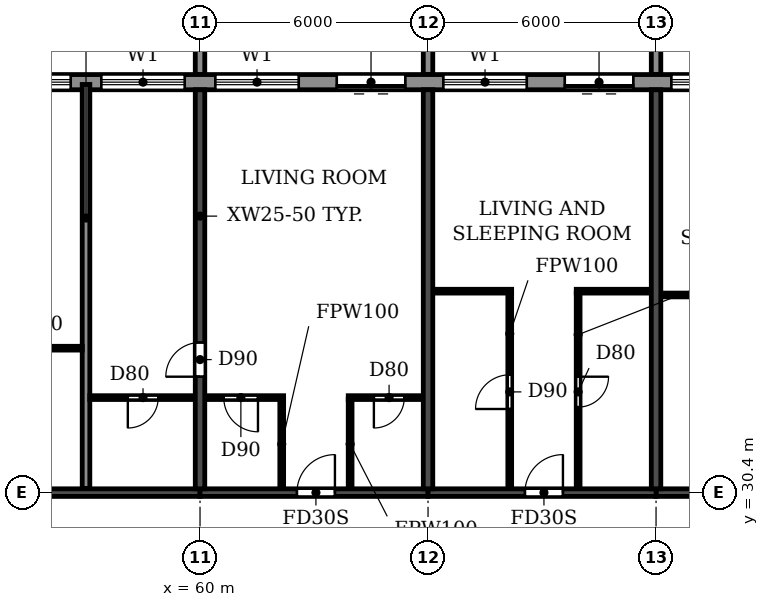
"""IFC4 building model, lengths in metres.
Left out: names, types, materials, properties, quantities, classifications, styles, units other than length and angle.
Written with IfcOpenShell. Run it as: python <this file> out.ifc"""

import sys

from ifc_helpers import new_model, si_unit, direction, frame, frame_2d, origin, place, context, subcontext, project, spatial, polyline, rectangle, outline, extrude, source, transform, mapped, element, fill, save


model = new_model("IFC4")
c1 = context("Model", 3, precision=1e-05, world=origin(), true_north=direction((0.0, 1.0)))
c2 = subcontext(c1, "Body", "Model", "MODEL_VIEW")
j1 = project(units=[si_unit("LENGTHUNIT", "METRE"), si_unit("PLANEANGLEUNIT", "RADIAN")], contexts=[c1])
p1 = place(None, origin())
s1 = spatial("IfcSite", under=j1, at=p1, CompositionType="ELEMENT")
p2 = place(p1, origin())
s2 = spatial("IfcBuilding", under=s1, at=p2, CompositionType="ELEMENT")
p3 = place(p2, frame((0.0, 0.0, 221.4)))
s3 = spatial("IfcBuildingStorey", under=s2, at=p3, CompositionType="ELEMENT", Elevation=221.4)
p4 = place(p3, frame((60.0, 30.5, 0.0), z_axis=(0.0, 0.0, 1.0), x_axis=(0.0, 1.0, 0.0)))
e1 = element("IfcWall", 1, at=p4, inside=s3, PredefinedType="SHEAR", context=c2, shape_type="SweptSolid", body=[
    extrude(rectangle(XDim=10.5, YDim=0.25, at=frame_2d((5.25, 0.0))), origin(), (0.0, 0.0, 1.0), 3.08),
])
p5 = place(p4, frame((2.95, 0.0, 0.0)))
e2 = element("IfcOpeningElement", 2, at=p5, cuts=e1, PredefinedType="OPENING", context=c2, shape_type="SweptSolid", body=[
    extrude(rectangle(XDim=0.9, YDim=2.1, at=frame_2d((0.45, 1.05))), frame((0.0, 0.135, 0.0), z_axis=(0.0, -1.0, 0.0), x_axis=(1.0, 0.0, 0.0)), (0.0, 0.0, 1.0), 0.27),
])
for number, where, z_axis, x_axis in (
    (3, (66.0, 30.5, 0.0), (0.0, 0.0, 1.0), (0.0, 1.0, 0.0)),
    (4, (72.0, 30.5, 0.0), (0.0, 0.0, 1.0), (0.0, 1.0, 0.0)),
):
    element("IfcWall", number, at=place(p3, frame(where, z_axis=z_axis, x_axis=x_axis)), inside=s3, PredefinedType="SHEAR", context=c2, shape_type="SweptSolid", body=[
        extrude(rectangle(XDim=10.5, YDim=0.25, at=frame_2d((5.25, 0.0))), origin(), (0.0, 0.0, 1.0), 3.08),
    ])
p6 = place(p3, frame((54.0, 30.4, 0.0), z_axis=(0.0, 0.0, 1.0), x_axis=(1.0, 0.0, 0.0)))
e5 = element("IfcWall", 5, at=p6, inside=s3, PredefinedType="SHEAR", context=c2, shape_type="SweptSolid", body=[
    extrude(rectangle(XDim=6.0, YDim=0.2, at=frame_2d((3.0, 0.0))), origin(), (0.0, 0.0, 1.0), 2.48),
])
p7 = place(p3, frame((60.0, 30.4, 0.0), z_axis=(0.0, 0.0, 1.0), x_axis=(1.0, 0.0, 0.0)))
e6 = element("IfcWall", 6, at=p7, inside=s3, PredefinedType="SHEAR", context=c2, shape_type="SweptSolid", body=[
    extrude(rectangle(XDim=6.0, YDim=0.2, at=frame_2d((3.0, 0.0))), origin(), (0.0, 0.0, 1.0), 2.48),
])
p8 = place(p7, frame((2.55, 0.0, 0.0)))
e7 = element("IfcOpeningElement", 7, at=p8, cuts=e6, PredefinedType="OPENING", context=c2, shape_type="SweptSolid", body=[
    extrude(rectangle(XDim=1.0, YDim=2.1, at=frame_2d((0.5, 1.05))), frame((0.0, 0.11, 0.0), z_axis=(0.0, -1.0, 0.0), x_axis=(1.0, 0.0, 0.0)), (0.0, 0.0, 1.0), 0.22),
])
p9 = place(p3, frame((66.0, 30.4, 0.0), z_axis=(0.0, 0.0, 1.0), x_axis=(1.0, 0.0, 0.0)))
e8 = element("IfcWall", 8, at=p9, inside=s3, PredefinedType="SHEAR", context=c2, shape_type="SweptSolid", body=[
    extrude(rectangle(XDim=6.0, YDim=0.2, at=frame_2d((3.0, 0.0))), origin(), (0.0, 0.0, 1.0), 2.48),
])
p10 = place(p9, frame((2.55, 0.0, 0.0)))
e9 = element("IfcOpeningElement", 9, at=p10, cuts=e8, PredefinedType="OPENING", context=c2, shape_type="SweptSolid", body=[
    extrude(rectangle(XDim=1.0, YDim=2.1, at=frame_2d((0.5, 1.05))), frame((0.0, 0.11, 0.0), z_axis=(0.0, -1.0, 0.0), x_axis=(1.0, 0.0, 0.0)), (0.0, 0.0, 1.0), 0.22),
])
p11 = place(p3, frame((72.0, 30.4, 0.0), z_axis=(0.0, 0.0, 1.0), x_axis=(1.0, 0.0, 0.0)))
e10 = element("IfcWall", 10, at=p11, inside=s3, PredefinedType="SHEAR", context=c2, shape_type="SweptSolid", body=[
    extrude(rectangle(XDim=6.0, YDim=0.2, at=frame_2d((3.0, 0.0))), origin(), (0.0, 0.0, 1.0), 2.48),
])
p12 = place(p11, frame((2.45, 0.0, 0.0)))
e11 = element("IfcOpeningElement", 11, at=p12, cuts=e10, PredefinedType="OPENING", context=c2, shape_type="SweptSolid", body=[
    extrude(rectangle(XDim=1.0, YDim=2.1, at=frame_2d((0.5, 1.05))), frame((0.0, 0.11, 0.0), z_axis=(0.0, -1.0, 0.0), x_axis=(1.0, 0.0, 0.0)), (0.0, 0.0, 1.0), 0.22),
])
p13 = place(p3, frame((79.317, 41.2, 0.0), z_axis=(0.0, 0.0, 1.0), x_axis=(-1.0, 0.0, 0.0)))
e12 = element("IfcWall", 12, at=p13, inside=s3, PredefinedType="STANDARD", context=c2, shape_type="SweptSolid", body=[
    extrude(rectangle(XDim=56.634, YDim=0.4, at=frame_2d((28.317, 0.0))), origin(), (0.0, 0.0, 1.0), 3.08),
])
p14 = place(p13, frame((52.717, 0.0, 0.9)))
e13 = element("IfcOpeningElement", 13, at=p14, cuts=e12, PredefinedType="OPENING", context=c2, shape_type="SweptSolid", body=[
    extrude(rectangle(XDim=2.2, YDim=1.5, at=frame_2d((1.1, 0.75))), frame((0.0, 0.21, 0.0), z_axis=(0.0, -1.0, 0.0), x_axis=(1.0, 0.0, 0.0)), (0.0, 0.0, 1.0), 0.42),
])
p15 = place(p13, frame((49.717, 0.0, 0.9)))
e14 = element("IfcOpeningElement", 14, at=p15, cuts=e12, PredefinedType="OPENING", context=c2, shape_type="SweptSolid", body=[
    extrude(rectangle(XDim=2.2, YDim=1.5, at=frame_2d((1.1, 0.75))), frame((0.0, 0.21, 0.0), z_axis=(0.0, -1.0, 0.0), x_axis=(1.0, 0.0, 0.0)), (0.0, 0.0, 1.0), 0.42),
])
p16 = place(p13, frame((46.917, 0.0, 0.0)))
e15 = element("IfcOpeningElement", 15, at=p16, cuts=e12, PredefinedType="OPENING", context=c2, shape_type="SweptSolid", body=[
    extrude(rectangle(XDim=1.8, YDim=2.4, at=frame_2d((0.9, 1.2))), frame((0.0, 0.21, 0.0), z_axis=(0.0, -1.0, 0.0), x_axis=(1.0, 0.0, 0.0)), (0.0, 0.0, 1.0), 0.42),
])
p17 = place(p13, frame((43.717, 0.0, 0.9)))
e16 = element("IfcOpeningElement", 16, at=p17, cuts=e12, PredefinedType="OPENING", context=c2, shape_type="SweptSolid", body=[
    extrude(rectangle(XDim=2.2, YDim=1.5, at=frame_2d((1.1, 0.75))), frame((0.0, 0.21, 0.0), z_axis=(0.0, -1.0, 0.0), x_axis=(1.0, 0.0, 0.0)), (0.0, 0.0, 1.0), 0.42),
])
p18 = place(p13, frame((40.717, 0.0, 0.9)))
e17 = element("IfcOpeningElement", 17, at=p18, cuts=e12, PredefinedType="OPENING", context=c2, shape_type="SweptSolid", body=[
    extrude(rectangle(XDim=2.2, YDim=1.5, at=frame_2d((1.1, 0.75))), frame((0.0, 0.21, 0.0), z_axis=(0.0, -1.0, 0.0), x_axis=(1.0, 0.0, 0.0)), (0.0, 0.0, 1.0), 0.42),
])
p19 = place(p13, frame((37.917, 0.0, 0.0)))
e18 = element("IfcOpeningElement", 18, at=p19, cuts=e12, PredefinedType="OPENING", context=c2, shape_type="SweptSolid", body=[
    extrude(rectangle(XDim=1.8, YDim=2.4, at=frame_2d((0.9, 1.2))), frame((0.0, 0.21, 0.0), z_axis=(0.0, -1.0, 0.0), x_axis=(1.0, 0.0, 0.0)), (0.0, 0.0, 1.0), 0.42),
])
p20 = place(p13, frame((34.717, 0.0, 0.9)))
e19 = element("IfcOpeningElement", 19, at=p20, cuts=e12, PredefinedType="OPENING", context=c2, shape_type="SweptSolid", body=[
    extrude(rectangle(XDim=2.2, YDim=1.5, at=frame_2d((1.1, 0.75))), frame((0.0, 0.21, 0.0), z_axis=(0.0, -1.0, 0.0), x_axis=(1.0, 0.0, 0.0)), (0.0, 0.0, 1.0), 0.42),
])
p21 = place(p13, frame((31.717, 0.0, 0.9)))
e20 = element("IfcOpeningElement", 20, at=p21, cuts=e12, PredefinedType="OPENING", context=c2, shape_type="SweptSolid", body=[
    extrude(rectangle(XDim=2.2, YDim=1.5, at=frame_2d((1.1, 0.75))), frame((0.0, 0.21, 0.0), z_axis=(0.0, -1.0, 0.0), x_axis=(1.0, 0.0, 0.0)), (0.0, 0.0, 1.0), 0.42),
])
p22 = place(p13, frame((28.717, 0.0, 0.9)))
e21 = element("IfcOpeningElement", 21, at=p22, cuts=e12, PredefinedType="OPENING", context=c2, shape_type="SweptSolid", body=[
    extrude(rectangle(XDim=2.2, YDim=1.5, at=frame_2d((1.1, 0.75))), frame((0.0, 0.21, 0.0), z_axis=(0.0, -1.0, 0.0), x_axis=(1.0, 0.0, 0.0)), (0.0, 0.0, 1.0), 0.42),
])
p23 = place(p13, frame((25.917, 0.0, 0.0)))
e22 = element("IfcOpeningElement", 22, at=p23, cuts=e12, PredefinedType="OPENING", context=c2, shape_type="SweptSolid", body=[
    extrude(rectangle(XDim=1.8, YDim=2.4, at=frame_2d((0.9, 1.2))), frame((0.0, 0.21, 0.0), z_axis=(0.0, -1.0, 0.0), x_axis=(1.0, 0.0, 0.0)), (0.0, 0.0, 1.0), 0.42),
])
p24 = place(p13, frame((22.717, 0.0, 0.9)))
e23 = element("IfcOpeningElement", 23, at=p24, cuts=e12, PredefinedType="OPENING", context=c2, shape_type="SweptSolid", body=[
    extrude(rectangle(XDim=2.2, YDim=1.5, at=frame_2d((1.1, 0.75))), frame((0.0, 0.21, 0.0), z_axis=(0.0, -1.0, 0.0), x_axis=(1.0, 0.0, 0.0)), (0.0, 0.0, 1.0), 0.42),
])
p25 = place(p13, frame((19.717, 0.0, 0.9)))
e24 = element("IfcOpeningElement", 24, at=p25, cuts=e12, PredefinedType="OPENING", context=c2, shape_type="SweptSolid", body=[
    extrude(rectangle(XDim=2.2, YDim=1.5, at=frame_2d((1.1, 0.75))), frame((0.0, 0.21, 0.0), z_axis=(0.0, -1.0, 0.0), x_axis=(1.0, 0.0, 0.0)), (0.0, 0.0, 1.0), 0.42),
])
p26 = place(p13, frame((16.717, 0.0, 0.9)))
e25 = element("IfcOpeningElement", 25, at=p26, cuts=e12, PredefinedType="OPENING", context=c2, shape_type="SweptSolid", body=[
    extrude(rectangle(XDim=2.2, YDim=1.5, at=frame_2d((1.1, 0.75))), frame((0.0, 0.21, 0.0), z_axis=(0.0, -1.0, 0.0), x_axis=(1.0, 0.0, 0.0)), (0.0, 0.0, 1.0), 0.42),
])
p27 = place(p13, frame((13.917, 0.0, 0.0)))
e26 = element("IfcOpeningElement", 26, at=p27, cuts=e12, PredefinedType="OPENING", context=c2, shape_type="SweptSolid", body=[
    extrude(rectangle(XDim=1.8, YDim=2.4, at=frame_2d((0.9, 1.2))), frame((0.0, 0.21, 0.0), z_axis=(0.0, -1.0, 0.0), x_axis=(1.0, 0.0, 0.0)), (0.0, 0.0, 1.0), 0.42),
])
p28 = place(p13, frame((10.717, 0.0, 0.9)))
e27 = element("IfcOpeningElement", 27, at=p28, cuts=e12, PredefinedType="OPENING", context=c2, shape_type="SweptSolid", body=[
    extrude(rectangle(XDim=2.2, YDim=1.5, at=frame_2d((1.1, 0.75))), frame((0.0, 0.21, 0.0), z_axis=(0.0, -1.0, 0.0), x_axis=(1.0, 0.0, 0.0)), (0.0, 0.0, 1.0), 0.42),
])
p29 = place(p13, frame((7.917, 0.0, 0.0)))
e28 = element("IfcOpeningElement", 28, at=p29, cuts=e12, PredefinedType="OPENING", context=c2, shape_type="SweptSolid", body=[
    extrude(rectangle(XDim=1.8, YDim=2.4, at=frame_2d((0.9, 1.2))), frame((0.0, 0.21, 0.0), z_axis=(0.0, -1.0, 0.0), x_axis=(1.0, 0.0, 0.0)), (0.0, 0.0, 1.0), 0.42),
])
p30 = place(p13, frame((4.717, 0.0, 0.9)))
e29 = element("IfcOpeningElement", 29, at=p30, cuts=e12, PredefinedType="OPENING", context=c2, shape_type="SweptSolid", body=[
    extrude(rectangle(XDim=2.2, YDim=1.5, at=frame_2d((1.1, 0.75))), frame((0.0, 0.21, 0.0), z_axis=(0.0, -1.0, 0.0), x_axis=(1.0, 0.0, 0.0)), (0.0, 0.0, 1.0), 0.42),
])
p31 = place(p13, frame((1.917, 0.0, 0.0)))
e30 = element("IfcOpeningElement", 30, at=p31, cuts=e12, PredefinedType="OPENING", context=c2, shape_type="SweptSolid", body=[
    extrude(rectangle(XDim=1.8, YDim=2.4, at=frame_2d((0.9, 1.2))), frame((0.0, 0.21, 0.0), z_axis=(0.0, -1.0, 0.0), x_axis=(1.0, 0.0, 0.0)), (0.0, 0.0, 1.0), 0.42),
])
m1 = source(origin(), c2, "Body", "SweptSolid", [
    extrude(outline(polyline([(0.0, 0.0), (0.25, 0.0), (0.25, 3.1), (0.0, 3.1), (0.0, 0.0)])), origin(), (0.0, 0.0, 1.0), 3.1),
])
for number, where in (
    (31, (59.875, 41.4, 0.0)),
    (32, (65.875, 41.4, 0.0)),
    (33, (71.875, 41.4, 0.0)),
):
    element("IfcWall", number, at=place(p3, frame(where)), inside=s3, PredefinedType="STANDARD", context=c2, shape_type="MappedRepresentation", body=[
        mapped(m1, transform((0.0, 0.0, 0.0))),
    ])
p32 = place(p3, frame((57.0, 30.51, 0.0), z_axis=(0.0, 0.0, 1.0), x_axis=(0.0, 1.0, 0.0)))
e34 = element("IfcWall", 34, at=p32, inside=s3, PredefinedType="PARTITIONING", context=c2, shape_type="SweptSolid", body=[
    extrude(rectangle(XDim=10.63, YDim=0.2, at=frame_2d((5.315, 0.0))), origin(), (0.0, 0.0, 1.0), 3.08),
])
p33 = place(p3, frame((57.1, 32.9, 0.0), z_axis=(0.0, 0.0, 1.0), x_axis=(1.0, 0.0, 0.0)))
e35 = element("IfcWall", 35, at=p33, inside=s3, PredefinedType="PARTITIONING", context=c2, shape_type="SweptSolid", body=[
    extrude(rectangle(XDim=2.765, YDim=0.1, at=frame_2d((1.382, 0.0))), origin(), (0.0, 0.0, 1.0), 3.08),
])
p34 = place(p33, frame((1.0, 0.0, 0.0)))
e36 = element("IfcOpeningElement", 36, at=p34, cuts=e35, PredefinedType="OPENING", context=c2, shape_type="SweptSolid", body=[
    extrude(rectangle(XDim=0.8, YDim=2.1, at=frame_2d((0.4, 1.05))), frame((0.0, 0.06, 0.0), z_axis=(0.0, -1.0, 0.0), x_axis=(1.0, 0.0, 0.0)), (0.0, 0.0, 1.0), 0.12),
])
p35 = place(p3, frame((60.135, 32.9, 0.0), z_axis=(0.0, 0.0, 1.0), x_axis=(1.0, 0.0, 0.0)))
e37 = element("IfcWall", 37, at=p35, inside=s3, PredefinedType="PARTITIONING", context=c2, shape_type="SweptSolid", body=[
    extrude(rectangle(XDim=2.065, YDim=0.1, at=frame_2d((1.032, 0.0))), origin(), (0.0, 0.0, 1.0), 3.08),
])
p36 = place(p35, frame((0.49, 0.0, 0.0)))
e38 = element("IfcOpeningElement", 38, at=p36, cuts=e37, PredefinedType="OPENING", context=c2, shape_type="SweptSolid", body=[
    extrude(rectangle(XDim=0.9, YDim=2.1, at=frame_2d((0.45, 1.05))), frame((0.0, 0.06, 0.0), z_axis=(0.0, -1.0, 0.0), x_axis=(1.0, 0.0, 0.0)), (0.0, 0.0, 1.0), 0.12),
])
p37 = place(p3, frame((63.9, 32.9, 0.0), z_axis=(0.0, 0.0, 1.0), x_axis=(1.0, 0.0, 0.0)))
e39 = element("IfcWall", 39, at=p37, inside=s3, PredefinedType="PARTITIONING", context=c2, shape_type="SweptSolid", body=[
    extrude(rectangle(XDim=1.965, YDim=0.1, at=frame_2d((0.982, 0.0))), origin(), (0.0, 0.0, 1.0), 3.08),
])
p38 = place(p37, frame((0.675, 0.0, 0.0)))
e40 = element("IfcOpeningElement", 40, at=p38, cuts=e39, PredefinedType="OPENING", context=c2, shape_type="SweptSolid", body=[
    extrude(rectangle(XDim=0.8, YDim=2.1, at=frame_2d((0.4, 1.05))), frame((0.0, 0.06, 0.0), z_axis=(0.0, -1.0, 0.0), x_axis=(1.0, 0.0, 0.0)), (0.0, 0.0, 1.0), 0.12),
])
p39 = place(p3, frame((54.135, 34.2, 0.0), z_axis=(0.0, 0.0, 1.0), x_axis=(1.0, 0.0, 0.0)))
e41 = element("IfcWall", 41, at=p39, inside=s3, PredefinedType="PARTITIONING", context=c2, shape_type="SweptSolid", body=[
    extrude(rectangle(XDim=2.765, YDim=0.1, at=frame_2d((1.382, 0.0))), origin(), (0.0, 0.0, 1.0), 3.08),
])
p40 = place(p39, frame((0.965, 0.0, 0.0)))
e42 = element("IfcOpeningElement", 42, at=p40, cuts=e41, PredefinedType="OPENING", context=c2, shape_type="SweptSolid", body=[
    extrude(rectangle(XDim=0.8, YDim=2.1, at=frame_2d((0.4, 1.05))), frame((0.0, 0.06, 0.0), z_axis=(0.0, -1.0, 0.0), x_axis=(1.0, 0.0, 0.0)), (0.0, 0.0, 1.0), 0.12),
])
p41 = place(p3, frame((72.135, 35.6, 0.0), z_axis=(0.0, 0.0, 1.0), x_axis=(1.0, 0.0, 0.0)))
e43 = element("IfcWall", 43, at=p41, inside=s3, PredefinedType="PARTITIONING", context=c2, shape_type="SweptSolid", body=[
    extrude(rectangle(XDim=1.965, YDim=0.1, at=frame_2d((0.982, 0.0))), origin(), (0.0, 0.0, 1.0), 3.08),
])
p42 = place(p3, frame((66.135, 35.7, 0.0), z_axis=(0.0, 0.0, 1.0), x_axis=(1.0, 0.0, 0.0)))
e44 = element("IfcWall", 44, at=p42, inside=s3, PredefinedType="PARTITIONING", context=c2, shape_type="SweptSolid", body=[
    extrude(rectangle(XDim=2.065, YDim=0.1, at=frame_2d((1.032, 0.0))), origin(), (0.0, 0.0, 1.0), 3.08),
])
p43 = place(p3, frame((69.9, 35.7, 0.0), z_axis=(0.0, 0.0, 1.0), x_axis=(1.0, 0.0, 0.0)))
e45 = element("IfcWall", 45, at=p43, inside=s3, PredefinedType="PARTITIONING", context=c2, shape_type="SweptSolid", body=[
    extrude(rectangle(XDim=1.965, YDim=0.1, at=frame_2d((0.982, 0.0))), origin(), (0.0, 0.0, 1.0), 3.08),
])
for number, where, z_axis, x_axis in (
    (46, (62.15, 30.51, 0.0), (0.0, 0.0, 1.0), (0.0, 1.0, 0.0)),
    (47, (63.95, 30.51, 0.0), (0.0, 0.0, 1.0), (0.0, 1.0, 0.0)),
):
    element("IfcWall", number, at=place(p3, frame(where, z_axis=z_axis, x_axis=x_axis)), inside=s3, PredefinedType="PARTITIONING", context=c2, shape_type="SweptSolid", body=[
        extrude(rectangle(XDim=2.34, YDim=0.1, at=frame_2d((1.17, 0.0))), origin(), (0.0, 0.0, 1.0), 3.08),
    ])
p44 = place(p3, frame((68.15, 30.51, 0.0), z_axis=(0.0, 0.0, 1.0), x_axis=(0.0, 1.0, 0.0)))
e48 = element("IfcWall", 48, at=p44, inside=s3, PredefinedType="PARTITIONING", context=c2, shape_type="SweptSolid", body=[
    extrude(rectangle(XDim=5.14, YDim=0.1, at=frame_2d((2.57, 0.0))), origin(), (0.0, 0.0, 1.0), 3.08),
])
p45 = place(p44, frame((2.09, 0.0, 0.0)))
e49 = element("IfcOpeningElement", 49, at=p45, cuts=e48, PredefinedType="OPENING", context=c2, shape_type="SweptSolid", body=[
    extrude(rectangle(XDim=0.9, YDim=2.1, at=frame_2d((0.45, 1.05))), frame((0.0, 0.06, 0.0), z_axis=(0.0, -1.0, 0.0), x_axis=(1.0, 0.0, 0.0)), (0.0, 0.0, 1.0), 0.12),
])
p46 = place(p3, frame((69.95, 30.51, 0.0), z_axis=(0.0, 0.0, 1.0), x_axis=(0.0, 1.0, 0.0)))
e50 = element("IfcWall", 50, at=p46, inside=s3, PredefinedType="PARTITIONING", context=c2, shape_type="SweptSolid", body=[
    extrude(rectangle(XDim=5.14, YDim=0.1, at=frame_2d((2.57, 0.0))), origin(), (0.0, 0.0, 1.0), 3.08),
])
p47 = place(p46, frame((2.14, 0.0, 0.0)))
e51 = element("IfcOpeningElement", 51, at=p47, cuts=e50, PredefinedType="OPENING", context=c2, shape_type="SweptSolid", body=[
    extrude(rectangle(XDim=0.8, YDim=2.1, at=frame_2d((0.4, 1.05))), frame((0.0, 0.06, 0.0), z_axis=(0.0, -1.0, 0.0), x_axis=(1.0, 0.0, 0.0)), (0.0, 0.0, 1.0), 0.12),
])
p48 = place(p24, origin())
e52 = element("IfcWindow", 52, at=p48, inside=s3, PartitioningType="DOUBLE_PANEL_HORIZONTAL", PredefinedType="WINDOW", context=c2, shape_type="SweptSolid", body=[
    extrude(rectangle(XDim=2.2, YDim=1.5, at=frame_2d((1.1, 0.75))), frame((0.0, 0.03, 0.0), z_axis=(0.0, -1.0, 0.0), x_axis=(1.0, 0.0, 0.0)), (0.0, 0.0, 1.0), 0.06),
])
fill(e23, e52)
p49 = place(p25, origin())
e53 = element("IfcWindow", 53, at=p49, inside=s3, PartitioningType="DOUBLE_PANEL_HORIZONTAL", PredefinedType="WINDOW", context=c2, shape_type="SweptSolid", body=[
    extrude(rectangle(XDim=2.2, YDim=1.5, at=frame_2d((1.1, 0.75))), frame((0.0, 0.03, 0.0), z_axis=(0.0, -1.0, 0.0), x_axis=(1.0, 0.0, 0.0)), (0.0, 0.0, 1.0), 0.06),
])
fill(e24, e53)
p50 = place(p26, origin())
e54 = element("IfcWindow", 54, at=p50, inside=s3, PartitioningType="DOUBLE_PANEL_HORIZONTAL", PredefinedType="WINDOW", context=c2, shape_type="SweptSolid", body=[
    extrude(rectangle(XDim=2.2, YDim=1.5, at=frame_2d((1.1, 0.75))), frame((0.0, 0.03, 0.0), z_axis=(0.0, -1.0, 0.0), x_axis=(1.0, 0.0, 0.0)), (0.0, 0.0, 1.0), 0.06),
])
fill(e25, e54)
p51 = place(p27, origin())
e55 = element("IfcDoor", 55, at=p51, inside=s3, OperationType="DOUBLE_DOOR_SLIDING", PredefinedType="DOOR", context=c2, shape_type="SweptSolid", body=[
    extrude(rectangle(XDim=1.8, YDim=2.4, at=frame_2d((0.9, 1.2))), frame((0.0, 0.025, 0.0), z_axis=(0.0, -1.0, 0.0), x_axis=(1.0, 0.0, 0.0)), (0.0, 0.0, 1.0), 0.05),
])
fill(e26, e55)
p52 = place(p28, origin())
e56 = element("IfcWindow", 56, at=p52, inside=s3, PartitioningType="DOUBLE_PANEL_HORIZONTAL", PredefinedType="WINDOW", context=c2, shape_type="SweptSolid", body=[
    extrude(rectangle(XDim=2.2, YDim=1.5, at=frame_2d((1.1, 0.75))), frame((0.0, 0.03, 0.0), z_axis=(0.0, -1.0, 0.0), x_axis=(1.0, 0.0, 0.0)), (0.0, 0.0, 1.0), 0.06),
])
fill(e27, e56)
p53 = place(p29, origin())
e57 = element("IfcDoor", 57, at=p53, inside=s3, OperationType="DOUBLE_DOOR_SLIDING", PredefinedType="DOOR", context=c2, shape_type="SweptSolid", body=[
    extrude(rectangle(XDim=1.8, YDim=2.4, at=frame_2d((0.9, 1.2))), frame((0.0, 0.025, 0.0), z_axis=(0.0, -1.0, 0.0), x_axis=(1.0, 0.0, 0.0)), (0.0, 0.0, 1.0), 0.05),
])
fill(e28, e57)
p54 = place(p30, origin())
e58 = element("IfcWindow", 58, at=p54, inside=s3, PartitioningType="DOUBLE_PANEL_HORIZONTAL", PredefinedType="WINDOW", context=c2, shape_type="SweptSolid", body=[
    extrude(rectangle(XDim=2.2, YDim=1.5, at=frame_2d((1.1, 0.75))), frame((0.0, 0.03, 0.0), z_axis=(0.0, -1.0, 0.0), x_axis=(1.0, 0.0, 0.0)), (0.0, 0.0, 1.0), 0.06),
])
fill(e29, e58)
p55 = place(p34, frame((0.8, 0.0, 0.0), z_axis=(0.0, 0.0, 1.0), x_axis=(-1.0, 0.0, 0.0)))
e59 = element("IfcDoor", 59, at=p55, inside=s3, OperationType="SINGLE_SWING_RIGHT", PredefinedType="DOOR", context=c2, shape_type="SweptSolid", body=[
    extrude(rectangle(XDim=0.8, YDim=2.1, at=frame_2d((0.4, 1.05))), frame((0.0, 0.025, 0.0), z_axis=(0.0, -1.0, 0.0), x_axis=(1.0, 0.0, 0.0)), (0.0, 0.0, 1.0), 0.05),
])
fill(e36, e59)
p56 = place(p5, origin())
e60 = element("IfcDoor", 60, at=p56, inside=s3, OperationType="SINGLE_SWING_LEFT", PredefinedType="DOOR", context=c2, shape_type="SweptSolid", body=[
    extrude(rectangle(XDim=0.9, YDim=2.1, at=frame_2d((0.45, 1.05))), frame((0.0, 0.025, 0.0), z_axis=(0.0, -1.0, 0.0), x_axis=(1.0, 0.0, 0.0)), (0.0, 0.0, 1.0), 0.05),
])
fill(e2, e60)
p57 = place(p36, frame((0.9, 0.0, 0.0), z_axis=(0.0, 0.0, 1.0), x_axis=(-1.0, 0.0, 0.0)))
e61 = element("IfcDoor", 61, at=p57, inside=s3, OperationType="SINGLE_SWING_LEFT", PredefinedType="DOOR", context=c2, shape_type="SweptSolid", body=[
    extrude(rectangle(XDim=0.9, YDim=2.1, at=frame_2d((0.45, 1.05))), frame((0.0, 0.025, 0.0), z_axis=(0.0, -1.0, 0.0), x_axis=(1.0, 0.0, 0.0)), (0.0, 0.0, 1.0), 0.05),
])
fill(e38, e61)
p58 = place(p8, origin())
e62 = element("IfcDoor", 62, at=p58, inside=s3, OperationType="SINGLE_SWING_RIGHT", PredefinedType="DOOR", context=c2, shape_type="SweptSolid", body=[
    extrude(rectangle(XDim=1.0, YDim=2.1, at=frame_2d((0.5, 1.05))), frame((0.0, 0.025, 0.0), z_axis=(0.0, -1.0, 0.0), x_axis=(1.0, 0.0, 0.0)), (0.0, 0.0, 1.0), 0.05),
])
fill(e7, e62)
p59 = place(p38, frame((0.8, 0.0, 0.0), z_axis=(0.0, 0.0, 1.0), x_axis=(-1.0, 0.0, 0.0)))
e63 = element("IfcDoor", 63, at=p59, inside=s3, OperationType="SINGLE_SWING_RIGHT", PredefinedType="DOOR", context=c2, shape_type="SweptSolid", body=[
    extrude(rectangle(XDim=0.8, YDim=2.1, at=frame_2d((0.4, 1.05))), frame((0.0, 0.025, 0.0), z_axis=(0.0, -1.0, 0.0), x_axis=(1.0, 0.0, 0.0)), (0.0, 0.0, 1.0), 0.05),
])
fill(e40, e63)
p60 = place(p45, origin())
e64 = element("IfcDoor", 64, at=p60, inside=s3, OperationType="SINGLE_SWING_LEFT", PredefinedType="DOOR", context=c2, shape_type="SweptSolid", body=[
    extrude(rectangle(XDim=0.9, YDim=2.1, at=frame_2d((0.45, 1.05))), frame((0.0, 0.025, 0.0), z_axis=(0.0, -1.0, 0.0), x_axis=(1.0, 0.0, 0.0)), (0.0, 0.0, 1.0), 0.05),
])
fill(e49, e64)
p61 = place(p10, origin())
e65 = element("IfcDoor", 65, at=p61, inside=s3, OperationType="SINGLE_SWING_RIGHT", PredefinedType="DOOR", context=c2, shape_type="SweptSolid", body=[
    extrude(rectangle(XDim=1.0, YDim=2.1, at=frame_2d((0.5, 1.05))), frame((0.0, 0.025, 0.0), z_axis=(0.0, -1.0, 0.0), x_axis=(1.0, 0.0, 0.0)), (0.0, 0.0, 1.0), 0.05),
])
fill(e9, e65)
p62 = place(p47, frame((0.8, 0.0, 0.0), z_axis=(0.0, 0.0, 1.0), x_axis=(-1.0, 0.0, 0.0)))
e66 = element("IfcDoor", 66, at=p62, inside=s3, OperationType="SINGLE_SWING_LEFT", PredefinedType="DOOR", context=c2, shape_type="SweptSolid", body=[
    extrude(rectangle(XDim=0.8, YDim=2.1, at=frame_2d((0.4, 1.05))), frame((0.0, 0.025, 0.0), z_axis=(0.0, -1.0, 0.0), x_axis=(1.0, 0.0, 0.0)), (0.0, 0.0, 1.0), 0.05),
])
fill(e51, e66)
save(model, sys.argv[1])
